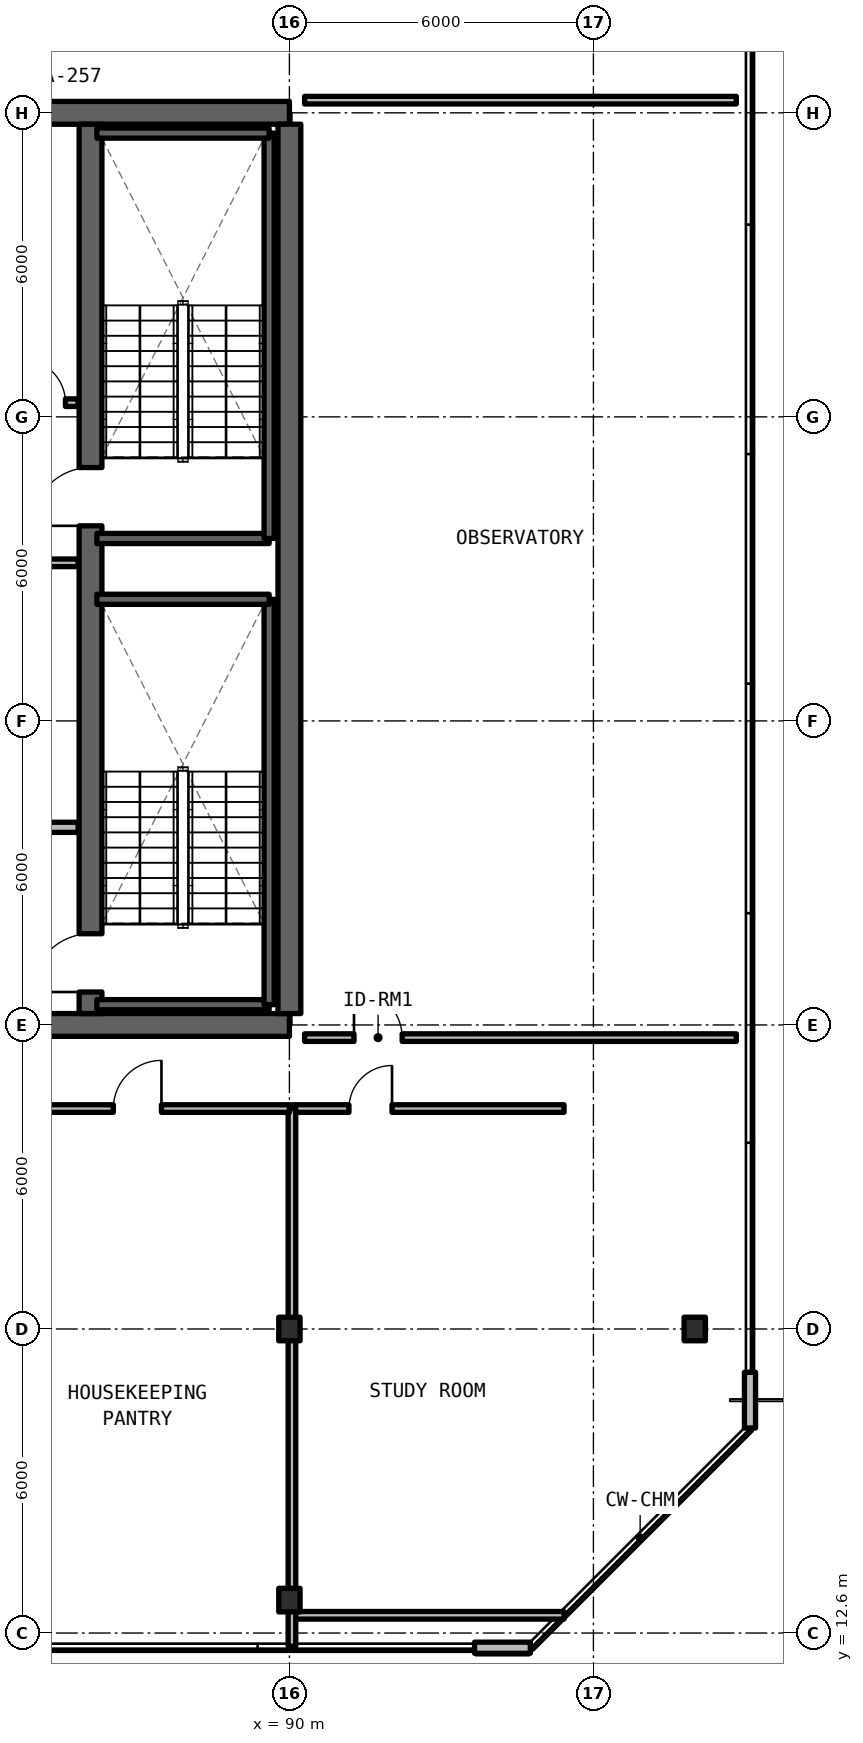
"""IFC4 building model, lengths in metres.
Left out: names, types, materials, properties, quantities, classifications, styles, units other than length and angle.
Written with IfcOpenShell. Run it as: python <this file> out.ifc"""

import sys

from ifc_helpers import new_model, si_unit, direction, frame, frame_2d, origin, origin_2d, place, context, subcontext, project, spatial, rectangle, i_section, extrude, element, fill, save


model = new_model("IFC4")
c1 = context("Model", 3, precision=1e-05, world=origin(), true_north=direction((0.0, 1.0)))
c2 = subcontext(c1, "Body", "Model", "MODEL_VIEW")
j1 = project(units=[si_unit("LENGTHUNIT", "METRE"), si_unit("PLANEANGLEUNIT", "RADIAN")], contexts=[c1])
p1 = place(None, origin())
s1 = spatial("IfcSite", under=j1, at=p1, CompositionType="ELEMENT")
p2 = place(p1, origin())
s2 = spatial("IfcBuilding", under=s1, at=p2, CompositionType="ELEMENT")
p3 = place(p2, frame((0.0, 0.0, 260.7)))
s3 = spatial("IfcBuildingStorey", under=s2, at=p3, CompositionType="ELEMENT", Elevation=260.7)
for number, where, z_axis, x_axis in (
    (1, (78.0, 24.6, 0.0), (0.0, 0.0, 1.0), (1.0, 0.0, 0.0)),
    (2, (90.0, 42.6, 0.0), (0.0, 0.0, 1.0), (-1.0, 0.0, 0.0)),
):
    element("IfcWall", number, at=place(p3, frame(where, z_axis=z_axis, x_axis=x_axis)), inside=s3, PredefinedType="SHEAR", context=c2, shape_type="SweptSolid", body=[
        extrude(rectangle(XDim=12.0, YDim=0.45, at=frame_2d((6.0, 0.0))), origin(), (0.0, 0.0, 1.0), 3.63),
    ])
p4 = place(p3, frame((90.0, 24.825, 0.0), z_axis=(0.0, 0.0, 1.0), x_axis=(0.0, 1.0, 0.0)))
e3 = element("IfcWall", 3, at=p4, inside=s3, PredefinedType="SHEAR", context=c2, shape_type="SweptSolid", body=[
    extrude(rectangle(XDim=17.55, YDim=0.45, at=frame_2d((8.775, 0.0))), origin(), (0.0, 0.0, 1.0), 3.63),
])
p5 = place(p3, frame((86.075, 24.825, 0.0), z_axis=(0.0, 0.0, 1.0), x_axis=(0.0, 1.0, 0.0)))
e4 = element("IfcWall", 4, at=p5, inside=s3, PredefinedType="SHEAR", context=c2, shape_type="SweptSolid", body=[
    extrude(rectangle(XDim=17.55, YDim=0.45, at=frame_2d((8.775, 0.0))), origin(), (0.0, 0.0, 1.0), 3.63),
])
p6 = place(p5, frame((0.425, 0.0, 0.0)))
e5 = element("IfcOpeningElement", 5, at=p6, cuts=e4, PredefinedType="OPENING", context=c2, shape_type="SweptSolid", body=[
    extrude(rectangle(XDim=1.15, YDim=2.15, at=frame_2d((0.575, 1.075))), frame((0.0, 0.235, 0.0), z_axis=(0.0, -1.0, 0.0), x_axis=(1.0, 0.0, 0.0)), (0.0, 0.0, 1.0), 0.47),
])
p7 = place(p5, frame((9.625, 0.0, 0.0)))
e6 = element("IfcOpeningElement", 6, at=p7, cuts=e4, PredefinedType="OPENING", context=c2, shape_type="SweptSolid", body=[
    extrude(rectangle(XDim=1.15, YDim=2.15, at=frame_2d((0.575, 1.075))), frame((0.0, 0.235, 0.0), z_axis=(0.0, -1.0, 0.0), x_axis=(1.0, 0.0, 0.0)), (0.0, 0.0, 1.0), 0.47),
])
for number, where, z_axis, x_axis in (
    (7, (90.0, 18.6, 0.0), (0.0, 0.0, 1.0), (1.0, 0.0, 0.0)),
    (8, (98.0, 18.6, 0.0), (0.0, 0.0, 1.0), (1.0, 0.0, 0.0)),
    (9, (90.0, 13.25, 0.0), (0.0, 0.0, 1.0), (1.0, 0.0, 0.0)),
):
    element("IfcColumn", number, at=place(p3, frame(where, z_axis=z_axis, x_axis=x_axis)), inside=s3, PredefinedType="COLUMN", context=c2, shape_type="SweptSolid", body=[
        extrude(i_section(OverallWidth=0.421, OverallDepth=0.465, WebThickness=0.045, FlangeThickness=0.07, FilletRadius=0.015, at=origin_2d()), origin(), (0.0, 0.0, 1.0), 3.63),
    ])
for number, where, z_axis, x_axis in (
    (10, (93.654, 12.31, 0.0), (0.0, 0.0, 1.0), (1.0, 0.0, 0.0)),
    (11, (99.09, 16.646, 0.0), (0.0, 0.0, 1.0), (0.0, 1.0, 0.0)),
):
    element("IfcWall", number, at=place(p3, frame(where, z_axis=z_axis, x_axis=x_axis)), inside=s3, PredefinedType="SOLIDWALL", context=c2, shape_type="SweptSolid", body=[
        extrude(rectangle(XDim=1.1, YDim=0.22, at=frame_2d((0.55, 0.0))), origin(), (0.0, 0.0, 1.0), 3.41),
    ])
p8 = place(p3, frame((78.245, 28.5, 0.0), z_axis=(0.0, 0.0, 1.0), x_axis=(1.0, 0.0, 0.0)))
e12 = element("IfcWall", 12, at=p8, inside=s3, PredefinedType="SOLIDWALL", context=c2, shape_type="SweptSolid", body=[
    extrude(rectangle(XDim=7.585, YDim=0.2, at=frame_2d((3.792, 0.0))), origin(), (0.0, 0.0, 1.0), 2.63),
])
p9 = place(p8, frame((3.555, 0.0, 0.0)))
e13 = element("IfcOpeningElement", 13, at=p9, cuts=e12, PredefinedType="OPENING", context=c2, shape_type="SweptSolid", body=[
    extrude(rectangle(XDim=1.0, YDim=2.15, at=frame_2d((0.5, 1.075))), frame((0.0, 0.11, 0.0), z_axis=(0.0, -1.0, 0.0), x_axis=(1.0, 0.0, 0.0)), (0.0, 0.0, 1.0), 0.22),
])
p10 = place(p3, frame((83.2, 33.72, 0.0), z_axis=(0.0, 0.0, 1.0), x_axis=(1.0, 0.0, 0.0)))
e14 = element("IfcWall", 14, at=p10, inside=s3, PredefinedType="SOLIDWALL", context=c2, shape_type="SweptSolid", body=[
    extrude(rectangle(XDim=2.63, YDim=0.15, at=frame_2d((1.315, 0.0))), origin(), (0.0, 0.0, 1.0), 2.63),
])
p11 = place(p3, frame((84.55, 36.88, 0.0), z_axis=(0.0, 0.0, 1.0), x_axis=(1.0, 0.0, 0.0)))
e15 = element("IfcWall", 15, at=p11, inside=s3, PredefinedType="SOLIDWALL", context=c2, shape_type="SweptSolid", body=[
    extrude(rectangle(XDim=1.28, YDim=0.15, at=frame_2d((0.64, 0.0))), origin(), (0.0, 0.0, 1.0), 2.63),
])
p12 = place(p11, frame((0.18, 0.0, 0.0)))
e16 = element("IfcOpeningElement", 16, at=p12, cuts=e15, PredefinedType="OPENING", context=c2, shape_type="SweptSolid", body=[
    extrude(rectangle(XDim=0.85, YDim=2.1, at=frame_2d((0.425, 1.05))), frame((0.0, 0.085, 0.0), z_axis=(0.0, -1.0, 0.0), x_axis=(1.0, 0.0, 0.0)), (0.0, 0.0, 1.0), 0.17),
])
p13 = place(p3, frame((90.3, 24.35, 0.0), z_axis=(0.0, 0.0, 1.0), x_axis=(1.0, 0.0, 0.0)))
e17 = element("IfcWall", 17, at=p13, inside=s3, PredefinedType="SOLIDWALL", context=c2, shape_type="SweptSolid", body=[
    extrude(rectangle(XDim=8.52, YDim=0.15, at=frame_2d((4.26, 0.0))), origin(), (0.0, 0.0, 1.0), 2.63),
])
p14 = place(p13, frame((0.975, 0.0, 0.0)))
e18 = element("IfcOpeningElement", 18, at=p14, cuts=e17, PredefinedType="OPENING", context=c2, shape_type="SweptSolid", body=[
    extrude(rectangle(XDim=0.95, YDim=2.15, at=frame_2d((0.475, 1.075))), frame((0.0, 0.085, 0.0), z_axis=(0.0, -1.0, 0.0), x_axis=(1.0, 0.0, 0.0)), (0.0, 0.0, 1.0), 0.17),
])
p15 = place(p3, frame((90.3, 42.85, 0.0), z_axis=(0.0, 0.0, 1.0), x_axis=(1.0, 0.0, 0.0)))
e19 = element("IfcWall", 19, at=p15, inside=s3, PredefinedType="SOLIDWALL", context=c2, shape_type="SweptSolid", body=[
    extrude(rectangle(XDim=8.52, YDim=0.15, at=frame_2d((4.26, 0.0))), origin(), (0.0, 0.0, 1.0), 2.63),
])
p16 = place(p3, frame((90.05, 12.95, 0.0), z_axis=(0.0, 0.0, 1.0), x_axis=(1.0, 0.0, 0.0)))
e20 = element("IfcWall", 20, at=p16, inside=s3, PredefinedType="SOLIDWALL", context=c2, shape_type="SweptSolid", body=[
    extrude(rectangle(XDim=5.37, YDim=0.15, at=frame_2d((2.685, 0.0))), origin(), (0.0, 0.0, 1.0), 2.63),
])
p17 = place(p3, frame((90.05, 22.95, 0.0), z_axis=(0.0, 0.0, 1.0), x_axis=(1.0, 0.0, 0.0)))
e21 = element("IfcWall", 21, at=p17, inside=s3, PredefinedType="SOLIDWALL", context=c2, shape_type="SweptSolid", body=[
    extrude(rectangle(XDim=5.37, YDim=0.15, at=frame_2d((2.685, 0.0))), origin(), (0.0, 0.0, 1.0), 2.63),
])
p18 = place(p17, frame((1.125, 0.0, 0.0)))
e22 = element("IfcOpeningElement", 22, at=p18, cuts=e21, PredefinedType="OPENING", context=c2, shape_type="SweptSolid", body=[
    extrude(rectangle(XDim=0.85, YDim=2.1, at=frame_2d((0.425, 1.05))), frame((0.0, 0.085, 0.0), z_axis=(0.0, -1.0, 0.0), x_axis=(1.0, 0.0, 0.0)), (0.0, 0.0, 1.0), 0.17),
])
p19 = place(p3, frame((90.05, 12.34, 0.0), z_axis=(0.0, 0.0, 1.0), x_axis=(0.0, 1.0, 0.0)))
e23 = element("IfcWall", 23, at=p19, inside=s3, PredefinedType="SOLIDWALL", context=c2, shape_type="SweptSolid", body=[
    extrude(rectangle(XDim=10.61, YDim=0.15, at=frame_2d((5.305, 0.0))), origin(), (0.0, 0.0, 1.0), 2.63),
])
p20 = place(p3, frame((84.0, 22.95, 0.0), z_axis=(0.0, 0.0, 1.0), x_axis=(1.0, 0.0, 0.0)))
e24 = element("IfcWall", 24, at=p20, inside=s3, PredefinedType="SOLIDWALL", context=c2, shape_type="SweptSolid", body=[
    extrude(rectangle(XDim=6.0, YDim=0.15, at=frame_2d((3.0, 0.0))), origin(), (0.0, 0.0, 1.0), 2.63),
])
p21 = place(p20, frame((2.525, 0.0, 0.0)))
e25 = element("IfcOpeningElement", 25, at=p21, cuts=e24, PredefinedType="OPENING", context=c2, shape_type="SweptSolid", body=[
    extrude(rectangle(XDim=0.95, YDim=2.15, at=frame_2d((0.475, 1.075))), frame((0.0, 0.085, 0.0), z_axis=(0.0, -1.0, 0.0), x_axis=(1.0, 0.0, 0.0)), (0.0, 0.0, 1.0), 0.17),
])
p22 = place(p3, frame((86.2, 25.0, 0.0), z_axis=(0.0, 0.0, 1.0), x_axis=(1.0, 0.0, 0.0)))
e26 = element("IfcWall", 26, at=p22, inside=s3, PredefinedType="SOLIDWALL", context=c2, shape_type="SweptSolid", body=[
    extrude(rectangle(XDim=3.4, YDim=0.2, at=frame_2d((1.7, 0.0))), origin(), (0.0, 0.0, 1.0), 3.63),
])
p23 = place(p3, frame((89.6, 25.0, 0.0), z_axis=(0.0, 0.0, 1.0), x_axis=(0.0, 1.0, 0.0)))
e27 = element("IfcWall", 27, at=p23, inside=s3, PredefinedType="SOLIDWALL", context=c2, shape_type="SweptSolid", body=[
    extrude(rectangle(XDim=8.0, YDim=0.2, at=frame_2d((4.0, 0.0))), origin(), (0.0, 0.0, 1.0), 3.63),
])
for number, where, z_axis, x_axis in (
    (28, (89.6, 33.0, 0.0), (0.0, 0.0, 1.0), (-1.0, 0.0, 0.0)),
    (29, (86.2, 34.2, 0.0), (0.0, 0.0, 1.0), (1.0, 0.0, 0.0)),
):
    element("IfcWall", number, at=place(p3, frame(where, z_axis=z_axis, x_axis=x_axis)), inside=s3, PredefinedType="SOLIDWALL", context=c2, shape_type="SweptSolid", body=[
        extrude(rectangle(XDim=3.4, YDim=0.2, at=frame_2d((1.7, 0.0))), origin(), (0.0, 0.0, 1.0), 3.63),
    ])
p24 = place(p3, frame((89.6, 34.2, 0.0), z_axis=(0.0, 0.0, 1.0), x_axis=(0.0, 1.0, 0.0)))
e30 = element("IfcWall", 30, at=p24, inside=s3, PredefinedType="SOLIDWALL", context=c2, shape_type="SweptSolid", body=[
    extrude(rectangle(XDim=8.0, YDim=0.2, at=frame_2d((4.0, 0.0))), origin(), (0.0, 0.0, 1.0), 3.63),
])
p25 = place(p3, frame((89.6, 42.2, 0.0), z_axis=(0.0, 0.0, 1.0), x_axis=(-1.0, 0.0, 0.0)))
e31 = element("IfcWall", 31, at=p25, inside=s3, PredefinedType="SOLIDWALL", context=c2, shape_type="SweptSolid", body=[
    extrude(rectangle(XDim=3.4, YDim=0.2, at=frame_2d((1.7, 0.0))), origin(), (0.0, 0.0, 1.0), 3.63),
])
p26 = place(p12, origin())
e32 = element("IfcDoor", 32, at=p26, inside=s3, OperationType="SINGLE_SWING_LEFT", PredefinedType="DOOR", context=c2, shape_type="SweptSolid", body=[
    extrude(rectangle(XDim=0.85, YDim=2.1, at=frame_2d((0.425, 1.05))), frame((0.0, 0.025, 0.0), z_axis=(0.0, -1.0, 0.0), x_axis=(1.0, 0.0, 0.0)), (0.0, 0.0, 1.0), 0.05),
])
fill(e16, e32)
p27 = place(p14, origin())
e33 = element("IfcDoor", 33, at=p27, inside=s3, OperationType="SINGLE_SWING_LEFT", PredefinedType="DOOR", context=c2, shape_type="SweptSolid", body=[
    extrude(rectangle(XDim=0.95, YDim=2.15, at=frame_2d((0.475, 1.075))), frame((0.0, 0.025, 0.0), z_axis=(0.0, -1.0, 0.0), x_axis=(1.0, 0.0, 0.0)), (0.0, 0.0, 1.0), 0.05),
])
fill(e18, e33)
p28 = place(p18, origin())
e34 = element("IfcDoor", 34, at=p28, inside=s3, OperationType="SINGLE_SWING_RIGHT", PredefinedType="DOOR", context=c2, shape_type="SweptSolid", body=[
    extrude(rectangle(XDim=0.85, YDim=2.1, at=frame_2d((0.425, 1.05))), frame((0.0, 0.025, 0.0), z_axis=(0.0, -1.0, 0.0), x_axis=(1.0, 0.0, 0.0)), (0.0, 0.0, 1.0), 0.05),
])
fill(e22, e34)
p29 = place(p21, origin())
e35 = element("IfcDoor", 35, at=p29, inside=s3, OperationType="SINGLE_SWING_RIGHT", PredefinedType="DOOR", context=c2, shape_type="SweptSolid", body=[
    extrude(rectangle(XDim=0.95, YDim=2.15, at=frame_2d((0.475, 1.075))), frame((0.0, 0.025, 0.0), z_axis=(0.0, -1.0, 0.0), x_axis=(1.0, 0.0, 0.0)), (0.0, 0.0, 1.0), 0.05),
])
fill(e25, e35)
p30 = place(p6, origin())
e36 = element("IfcDoor", 36, at=p30, inside=s3, OperationType="SINGLE_SWING_LEFT", PredefinedType="DOOR", context=c2, shape_type="SweptSolid", body=[
    extrude(rectangle(XDim=1.15, YDim=2.15, at=frame_2d((0.575, 1.075))), frame((0.0, 0.025, 0.0), z_axis=(0.0, -1.0, 0.0), x_axis=(1.0, 0.0, 0.0)), (0.0, 0.0, 1.0), 0.05),
])
fill(e5, e36)
p31 = place(p7, origin())
e37 = element("IfcDoor", 37, at=p31, inside=s3, OperationType="SINGLE_SWING_RIGHT", PredefinedType="DOOR", context=c2, shape_type="SweptSolid", body=[
    extrude(rectangle(XDim=1.15, YDim=2.15, at=frame_2d((0.575, 1.075))), frame((0.0, 0.025, 0.0), z_axis=(0.0, -1.0, 0.0), x_axis=(1.0, 0.0, 0.0)), (0.0, 0.0, 1.0), 0.05),
])
fill(e6, e37)
save(model, sys.argv[1])
